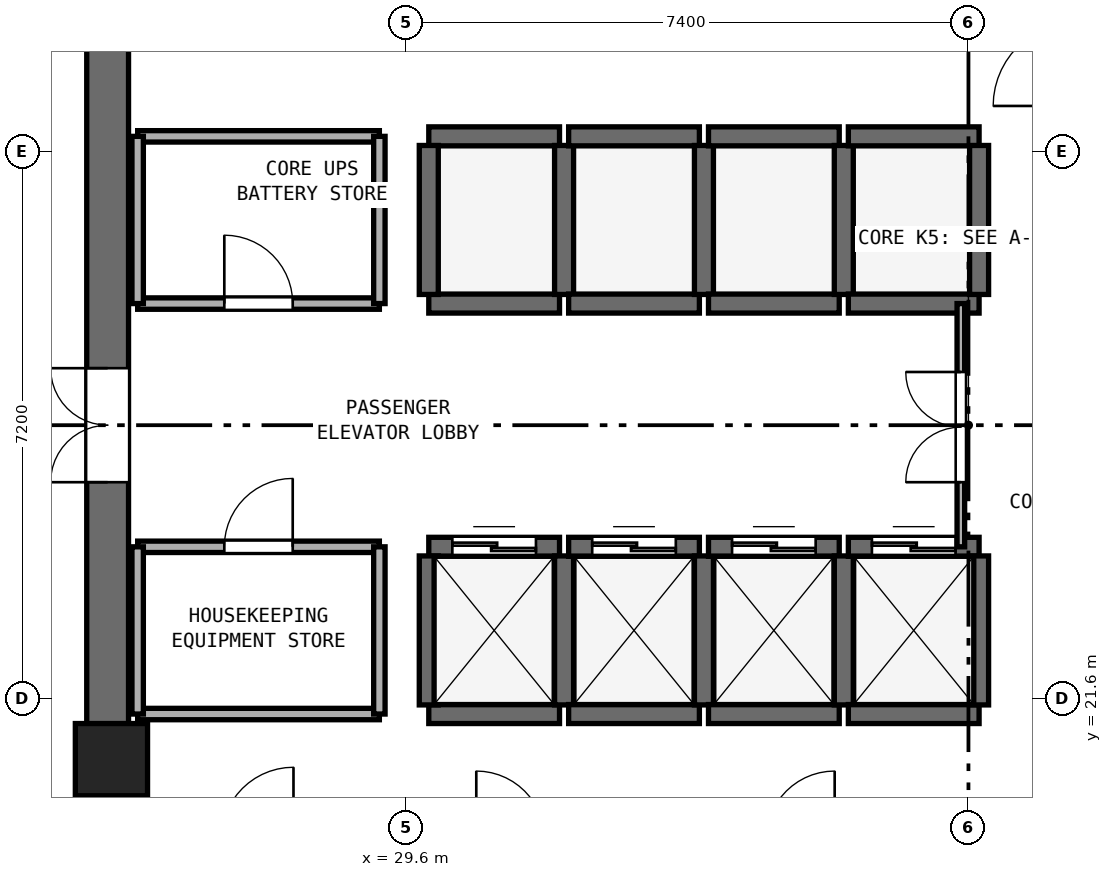
"""IFC4 building model, lengths in metres.
Left out: names, types, materials, properties, quantities, classifications, styles, units other than length and angle.
Written with IfcOpenShell. Run it as: python <this file> out.ifc"""

import sys

from ifc_helpers import new_model, si_unit, direction, frame, frame_2d, origin, origin_2d, place, context, subcontext, project, spatial, rectangle, extrude, element, fill, save


model = new_model("IFC4")
c1 = context("Model", 3, precision=1e-05, world=origin(), true_north=direction((0.0, 1.0)))
c2 = subcontext(c1, "Body", "Model", "MODEL_VIEW")
j1 = project(units=[si_unit("LENGTHUNIT", "METRE"), si_unit("PLANEANGLEUNIT", "RADIAN")], contexts=[c1])
p1 = place(None, origin())
s1 = spatial("IfcSite", under=j1, at=p1, CompositionType="ELEMENT")
p2 = place(p1, origin())
s2 = spatial("IfcBuilding", under=s1, at=p2, CompositionType="ELEMENT")
p3 = place(p2, frame((0.0, 0.0, 132.6)))
s3 = spatial("IfcBuildingStorey", under=s2, at=p3, CompositionType="ELEMENT", Elevation=132.6)
p4 = place(p3, frame((25.675, 17.55, 0.0), z_axis=(0.0, 0.0, 1.0), x_axis=(0.0, 1.0, 0.0)))
e1 = element("IfcWall", 1, at=p4, inside=s3, PredefinedType="SHEAR", context=c2, shape_type="SweptSolid", body=[
    extrude(rectangle(XDim=15.3, YDim=0.55, at=frame_2d((7.65, 0.0))), origin(), (0.0, 0.0, 1.0), 3.54),
])
p5 = place(p4, frame((6.9, 0.0, 0.0)))
e2 = element("IfcOpeningElement", 2, at=p5, cuts=e1, PredefinedType="OPENING", context=c2, shape_type="SweptSolid", body=[
    extrude(rectangle(XDim=1.5, YDim=2.15, at=frame_2d((0.75, 1.075))), frame((0.0, 0.285, 0.0), z_axis=(0.0, -1.0, 0.0), x_axis=(1.0, 0.0, 0.0)), (0.0, 0.0, 1.0), 0.57),
])
p6 = place(p3, frame((25.725, 20.8, 0.0), z_axis=(0.0, 0.0, 1.0), x_axis=(1.0, 0.0, 0.0)))
e3 = element("IfcColumn", 3, at=p6, inside=s3, PredefinedType="PILASTER", context=c2, shape_type="SweptSolid", body=[
    extrude(rectangle(XDim=0.95, YDim=0.95, at=origin_2d()), origin(), (0.0, 0.0, 1.0), 3.8),
])
p7 = place(p3, frame((29.9, 21.4, 0.0), z_axis=(0.0, 0.0, 1.0), x_axis=(1.0, 0.0, 0.0)))
e4 = element("IfcWall", 4, at=p7, inside=s3, PredefinedType="SHEAR", context=c2, shape_type="SweptSolid", body=[
    extrude(rectangle(XDim=1.72, YDim=0.25, at=frame_2d((0.86, 0.0))), origin(), (0.0, 0.0, 1.0), 3.54),
])
p8 = place(p3, frame((29.9, 23.6, 0.0), z_axis=(0.0, 0.0, 1.0), x_axis=(1.0, 0.0, 0.0)))
e5 = element("IfcWall", 5, at=p8, inside=s3, PredefinedType="SHEAR", context=c2, shape_type="SweptSolid", body=[
    extrude(rectangle(XDim=1.72, YDim=0.25, at=frame_2d((0.86, 0.0))), origin(), (0.0, 0.0, 1.0), 3.54),
])
p9 = place(p8, frame((0.31, 0.0, 0.0)))
e6 = element("IfcOpeningElement", 6, at=p9, cuts=e5, PredefinedType="OPENING", context=c2, shape_type="SweptSolid", body=[
    extrude(rectangle(XDim=1.1, YDim=2.15, at=frame_2d((0.55, 1.075))), frame((0.0, 0.135, 0.0), z_axis=(0.0, -1.0, 0.0), x_axis=(1.0, 0.0, 0.0)), (0.0, 0.0, 1.0), 0.27),
])
for number, where, z_axis, x_axis in (
    (7, (29.9, 21.52, 0.0), (0.0, 0.0, 1.0), (0.0, 1.0, 0.0)),
    (8, (31.68, 21.52, 0.0), (0.0, 0.0, 1.0), (0.0, 1.0, 0.0)),
):
    element("IfcWall", number, at=place(p3, frame(where, z_axis=z_axis, x_axis=x_axis)), inside=s3, PredefinedType="SHEAR", context=c2, shape_type="SweptSolid", body=[
        extrude(rectangle(XDim=1.96, YDim=0.25, at=frame_2d((0.98, 0.0))), origin(), (0.0, 0.0, 1.0), 3.54),
    ])
p10 = place(p3, frame((31.74, 21.4, 0.0), z_axis=(0.0, 0.0, 1.0), x_axis=(1.0, 0.0, 0.0)))
e9 = element("IfcWall", 9, at=p10, inside=s3, PredefinedType="SHEAR", context=c2, shape_type="SweptSolid", body=[
    extrude(rectangle(XDim=1.72, YDim=0.25, at=frame_2d((0.86, 0.0))), origin(), (0.0, 0.0, 1.0), 3.54),
])
p11 = place(p3, frame((31.74, 23.6, 0.0), z_axis=(0.0, 0.0, 1.0), x_axis=(1.0, 0.0, 0.0)))
e10 = element("IfcWall", 10, at=p11, inside=s3, PredefinedType="SHEAR", context=c2, shape_type="SweptSolid", body=[
    extrude(rectangle(XDim=1.72, YDim=0.25, at=frame_2d((0.86, 0.0))), origin(), (0.0, 0.0, 1.0), 3.54),
])
p12 = place(p11, frame((0.31, 0.0, 0.0)))
e11 = element("IfcOpeningElement", 11, at=p12, cuts=e10, PredefinedType="OPENING", context=c2, shape_type="SweptSolid", body=[
    extrude(rectangle(XDim=1.1, YDim=2.15, at=frame_2d((0.55, 1.075))), frame((0.0, 0.135, 0.0), z_axis=(0.0, -1.0, 0.0), x_axis=(1.0, 0.0, 0.0)), (0.0, 0.0, 1.0), 0.27),
])
p13 = place(p3, frame((33.52, 21.52, 0.0), z_axis=(0.0, 0.0, 1.0), x_axis=(0.0, 1.0, 0.0)))
e12 = element("IfcWall", 12, at=p13, inside=s3, PredefinedType="SHEAR", context=c2, shape_type="SweptSolid", body=[
    extrude(rectangle(XDim=1.96, YDim=0.25, at=frame_2d((0.98, 0.0))), origin(), (0.0, 0.0, 1.0), 3.54),
])
p14 = place(p3, frame((33.58, 21.4, 0.0), z_axis=(0.0, 0.0, 1.0), x_axis=(1.0, 0.0, 0.0)))
e13 = element("IfcWall", 13, at=p14, inside=s3, PredefinedType="SHEAR", context=c2, shape_type="SweptSolid", body=[
    extrude(rectangle(XDim=1.72, YDim=0.25, at=frame_2d((0.86, 0.0))), origin(), (0.0, 0.0, 1.0), 3.54),
])
p15 = place(p3, frame((33.58, 23.6, 0.0), z_axis=(0.0, 0.0, 1.0), x_axis=(1.0, 0.0, 0.0)))
e14 = element("IfcWall", 14, at=p15, inside=s3, PredefinedType="SHEAR", context=c2, shape_type="SweptSolid", body=[
    extrude(rectangle(XDim=1.72, YDim=0.25, at=frame_2d((0.86, 0.0))), origin(), (0.0, 0.0, 1.0), 3.54),
])
p16 = place(p15, frame((0.31, 0.0, 0.0)))
e15 = element("IfcOpeningElement", 15, at=p16, cuts=e14, PredefinedType="OPENING", context=c2, shape_type="SweptSolid", body=[
    extrude(rectangle(XDim=1.1, YDim=2.15, at=frame_2d((0.55, 1.075))), frame((0.0, 0.135, 0.0), z_axis=(0.0, -1.0, 0.0), x_axis=(1.0, 0.0, 0.0)), (0.0, 0.0, 1.0), 0.27),
])
p17 = place(p3, frame((35.36, 21.52, 0.0), z_axis=(0.0, 0.0, 1.0), x_axis=(0.0, 1.0, 0.0)))
e16 = element("IfcWall", 16, at=p17, inside=s3, PredefinedType="SHEAR", context=c2, shape_type="SweptSolid", body=[
    extrude(rectangle(XDim=1.96, YDim=0.25, at=frame_2d((0.98, 0.0))), origin(), (0.0, 0.0, 1.0), 3.54),
])
p18 = place(p3, frame((35.42, 21.4, 0.0), z_axis=(0.0, 0.0, 1.0), x_axis=(1.0, 0.0, 0.0)))
e17 = element("IfcWall", 17, at=p18, inside=s3, PredefinedType="SHEAR", context=c2, shape_type="SweptSolid", body=[
    extrude(rectangle(XDim=1.72, YDim=0.25, at=frame_2d((0.86, 0.0))), origin(), (0.0, 0.0, 1.0), 3.54),
])
p19 = place(p3, frame((35.42, 23.6, 0.0), z_axis=(0.0, 0.0, 1.0), x_axis=(1.0, 0.0, 0.0)))
e18 = element("IfcWall", 18, at=p19, inside=s3, PredefinedType="SHEAR", context=c2, shape_type="SweptSolid", body=[
    extrude(rectangle(XDim=1.72, YDim=0.25, at=frame_2d((0.86, 0.0))), origin(), (0.0, 0.0, 1.0), 3.54),
])
p20 = place(p19, frame((0.31, 0.0, 0.0)))
e19 = element("IfcOpeningElement", 19, at=p20, cuts=e18, PredefinedType="OPENING", context=c2, shape_type="SweptSolid", body=[
    extrude(rectangle(XDim=1.1, YDim=2.15, at=frame_2d((0.55, 1.075))), frame((0.0, 0.135, 0.0), z_axis=(0.0, -1.0, 0.0), x_axis=(1.0, 0.0, 0.0)), (0.0, 0.0, 1.0), 0.27),
])
p21 = place(p3, frame((37.14, 21.52, 0.0), z_axis=(0.0, 0.0, 1.0), x_axis=(0.0, 1.0, 0.0)))
e20 = element("IfcWall", 20, at=p21, inside=s3, PredefinedType="SHEAR", context=c2, shape_type="SweptSolid", body=[
    extrude(rectangle(XDim=1.96, YDim=0.25, at=frame_2d((0.98, 0.0))), origin(), (0.0, 0.0, 1.0), 3.54),
])
for number, where, z_axis, x_axis in (
    (21, (29.9, 26.8, 0.0), (0.0, 0.0, 1.0), (1.0, 0.0, 0.0)),
    (22, (29.9, 29.0, 0.0), (0.0, 0.0, 1.0), (1.0, 0.0, 0.0)),
):
    element("IfcWall", number, at=place(p3, frame(where, z_axis=z_axis, x_axis=x_axis)), inside=s3, PredefinedType="SHEAR", context=c2, shape_type="SweptSolid", body=[
        extrude(rectangle(XDim=1.72, YDim=0.25, at=frame_2d((0.86, 0.0))), origin(), (0.0, 0.0, 1.0), 3.54),
    ])
for number, where, z_axis, x_axis in (
    (23, (29.9, 26.92, 0.0), (0.0, 0.0, 1.0), (0.0, 1.0, 0.0)),
    (24, (31.68, 26.92, 0.0), (0.0, 0.0, 1.0), (0.0, 1.0, 0.0)),
):
    element("IfcWall", number, at=place(p3, frame(where, z_axis=z_axis, x_axis=x_axis)), inside=s3, PredefinedType="SHEAR", context=c2, shape_type="SweptSolid", body=[
        extrude(rectangle(XDim=1.96, YDim=0.25, at=frame_2d((0.98, 0.0))), origin(), (0.0, 0.0, 1.0), 3.54),
    ])
for number, where, z_axis, x_axis in (
    (25, (31.74, 26.8, 0.0), (0.0, 0.0, 1.0), (1.0, 0.0, 0.0)),
    (26, (31.74, 29.0, 0.0), (0.0, 0.0, 1.0), (1.0, 0.0, 0.0)),
):
    element("IfcWall", number, at=place(p3, frame(where, z_axis=z_axis, x_axis=x_axis)), inside=s3, PredefinedType="SHEAR", context=c2, shape_type="SweptSolid", body=[
        extrude(rectangle(XDim=1.72, YDim=0.25, at=frame_2d((0.86, 0.0))), origin(), (0.0, 0.0, 1.0), 3.54),
    ])
p22 = place(p3, frame((33.52, 26.92, 0.0), z_axis=(0.0, 0.0, 1.0), x_axis=(0.0, 1.0, 0.0)))
e27 = element("IfcWall", 27, at=p22, inside=s3, PredefinedType="SHEAR", context=c2, shape_type="SweptSolid", body=[
    extrude(rectangle(XDim=1.96, YDim=0.25, at=frame_2d((0.98, 0.0))), origin(), (0.0, 0.0, 1.0), 3.54),
])
for number, where, z_axis, x_axis in (
    (28, (33.58, 26.8, 0.0), (0.0, 0.0, 1.0), (1.0, 0.0, 0.0)),
    (29, (33.58, 29.0, 0.0), (0.0, 0.0, 1.0), (1.0, 0.0, 0.0)),
):
    element("IfcWall", number, at=place(p3, frame(where, z_axis=z_axis, x_axis=x_axis)), inside=s3, PredefinedType="SHEAR", context=c2, shape_type="SweptSolid", body=[
        extrude(rectangle(XDim=1.72, YDim=0.25, at=frame_2d((0.86, 0.0))), origin(), (0.0, 0.0, 1.0), 3.54),
    ])
p23 = place(p3, frame((35.36, 26.92, 0.0), z_axis=(0.0, 0.0, 1.0), x_axis=(0.0, 1.0, 0.0)))
e30 = element("IfcWall", 30, at=p23, inside=s3, PredefinedType="SHEAR", context=c2, shape_type="SweptSolid", body=[
    extrude(rectangle(XDim=1.96, YDim=0.25, at=frame_2d((0.98, 0.0))), origin(), (0.0, 0.0, 1.0), 3.54),
])
for number, where, z_axis, x_axis in (
    (31, (35.42, 26.8, 0.0), (0.0, 0.0, 1.0), (1.0, 0.0, 0.0)),
    (32, (35.42, 29.0, 0.0), (0.0, 0.0, 1.0), (1.0, 0.0, 0.0)),
):
    element("IfcWall", number, at=place(p3, frame(where, z_axis=z_axis, x_axis=x_axis)), inside=s3, PredefinedType="SHEAR", context=c2, shape_type="SweptSolid", body=[
        extrude(rectangle(XDim=1.72, YDim=0.25, at=frame_2d((0.86, 0.0))), origin(), (0.0, 0.0, 1.0), 3.54),
    ])
p24 = place(p3, frame((37.14, 26.92, 0.0), z_axis=(0.0, 0.0, 1.0), x_axis=(0.0, 1.0, 0.0)))
e33 = element("IfcWall", 33, at=p24, inside=s3, PredefinedType="SHEAR", context=c2, shape_type="SweptSolid", body=[
    extrude(rectangle(XDim=1.96, YDim=0.25, at=frame_2d((0.98, 0.0))), origin(), (0.0, 0.0, 1.0), 3.54),
])
p25 = place(p3, frame((26.07, 26.8, 0.0), z_axis=(0.0, 0.0, 1.0), x_axis=(1.0, 0.0, 0.0)))
e34 = element("IfcWall", 34, at=p25, inside=s3, PredefinedType="PARTITIONING", context=c2, shape_type="SweptSolid", body=[
    extrude(rectangle(XDim=3.18, YDim=0.15, at=frame_2d((1.59, 0.0))), origin(), (0.0, 0.0, 1.0), 3.54),
])
p26 = place(p25, frame((1.14, 0.0, 0.0)))
e35 = element("IfcOpeningElement", 35, at=p26, cuts=e34, PredefinedType="OPENING", context=c2, shape_type="SweptSolid", body=[
    extrude(rectangle(XDim=0.9, YDim=2.1, at=frame_2d((0.45, 1.05))), frame((0.0, 0.085, 0.0), z_axis=(0.0, -1.0, 0.0), x_axis=(1.0, 0.0, 0.0)), (0.0, 0.0, 1.0), 0.17),
])
p27 = place(p3, frame((26.07, 29.0, 0.0), z_axis=(0.0, 0.0, 1.0), x_axis=(1.0, 0.0, 0.0)))
e36 = element("IfcWall", 36, at=p27, inside=s3, PredefinedType="PARTITIONING", context=c2, shape_type="SweptSolid", body=[
    extrude(rectangle(XDim=3.18, YDim=0.15, at=frame_2d((1.59, 0.0))), origin(), (0.0, 0.0, 1.0), 3.54),
])
p28 = place(p3, frame((26.07, 26.8, 0.0), z_axis=(0.0, 0.0, 1.0), x_axis=(0.0, 1.0, 0.0)))
e37 = element("IfcWall", 37, at=p28, inside=s3, PredefinedType="PARTITIONING", context=c2, shape_type="SweptSolid", body=[
    extrude(rectangle(XDim=2.2, YDim=0.15, at=frame_2d((1.1, 0.0))), origin(), (0.0, 0.0, 1.0), 2.64),
])
p29 = place(p3, frame((29.25, 26.8, 0.0), z_axis=(0.0, 0.0, 1.0), x_axis=(0.0, 1.0, 0.0)))
e38 = element("IfcWall", 38, at=p29, inside=s3, PredefinedType="PARTITIONING", context=c2, shape_type="SweptSolid", body=[
    extrude(rectangle(XDim=2.2, YDim=0.15, at=frame_2d((1.1, 0.0))), origin(), (0.0, 0.0, 1.0), 3.54),
])
p30 = place(p3, frame((26.07, 21.4, 0.0), z_axis=(0.0, 0.0, 1.0), x_axis=(1.0, 0.0, 0.0)))
e39 = element("IfcWall", 39, at=p30, inside=s3, PredefinedType="PARTITIONING", context=c2, shape_type="SweptSolid", body=[
    extrude(rectangle(XDim=3.18, YDim=0.15, at=frame_2d((1.59, 0.0))), origin(), (0.0, 0.0, 1.0), 3.54),
])
p31 = place(p3, frame((26.07, 23.6, 0.0), z_axis=(0.0, 0.0, 1.0), x_axis=(1.0, 0.0, 0.0)))
e40 = element("IfcWall", 40, at=p31, inside=s3, PredefinedType="PARTITIONING", context=c2, shape_type="SweptSolid", body=[
    extrude(rectangle(XDim=3.18, YDim=0.15, at=frame_2d((1.59, 0.0))), origin(), (0.0, 0.0, 1.0), 3.54),
])
p32 = place(p31, frame((1.14, 0.0, 0.0)))
e41 = element("IfcOpeningElement", 41, at=p32, cuts=e40, PredefinedType="OPENING", context=c2, shape_type="SweptSolid", body=[
    extrude(rectangle(XDim=0.9, YDim=2.1, at=frame_2d((0.45, 1.05))), frame((0.0, 0.085, 0.0), z_axis=(0.0, -1.0, 0.0), x_axis=(1.0, 0.0, 0.0)), (0.0, 0.0, 1.0), 0.17),
])
p33 = place(p3, frame((26.07, 21.4, 0.0), z_axis=(0.0, 0.0, 1.0), x_axis=(0.0, 1.0, 0.0)))
e42 = element("IfcWall", 42, at=p33, inside=s3, PredefinedType="PARTITIONING", context=c2, shape_type="SweptSolid", body=[
    extrude(rectangle(XDim=2.2, YDim=0.15, at=frame_2d((1.1, 0.0))), origin(), (0.0, 0.0, 1.0), 2.64),
])
p34 = place(p3, frame((29.25, 21.4, 0.0), z_axis=(0.0, 0.0, 1.0), x_axis=(0.0, 1.0, 0.0)))
e43 = element("IfcWall", 43, at=p34, inside=s3, PredefinedType="PARTITIONING", context=c2, shape_type="SweptSolid", body=[
    extrude(rectangle(XDim=2.2, YDim=0.15, at=frame_2d((1.1, 0.0))), origin(), (0.0, 0.0, 1.0), 3.54),
])
p35 = place(p3, frame((36.9, 23.6, 0.0), z_axis=(0.0, 0.0, 1.0), x_axis=(0.0, 1.0, 0.0)))
e44 = element("IfcWall", 44, at=p35, inside=s3, PredefinedType="PARTITIONING", context=c2, shape_type="SweptSolid", body=[
    extrude(rectangle(XDim=3.2, YDim=0.1, at=frame_2d((1.6, 0.0))), origin(), (0.0, 0.0, 1.0), 3.54),
])
p36 = place(p35, frame((0.85, 0.0, 0.0)))
e45 = element("IfcOpeningElement", 45, at=p36, cuts=e44, PredefinedType="OPENING", context=c2, shape_type="SweptSolid", body=[
    extrude(rectangle(XDim=1.45, YDim=2.12, at=frame_2d((0.725, 1.06))), frame((0.0, 0.06, 0.0), z_axis=(0.0, -1.0, 0.0), x_axis=(1.0, 0.0, 0.0)), (0.0, 0.0, 1.0), 0.12),
])
p37 = place(p9, origin())
e46 = element("IfcDoor", 46, at=p37, inside=s3, OperationType="DOUBLE_DOOR_SLIDING", PredefinedType="DOOR", context=c2, shape_type="SweptSolid", body=[
    extrude(rectangle(XDim=1.1, YDim=2.15, at=frame_2d((0.55, 1.075))), frame((0.0, 0.025, 0.0), z_axis=(0.0, -1.0, 0.0), x_axis=(1.0, 0.0, 0.0)), (0.0, 0.0, 1.0), 0.05),
])
fill(e6, e46)
p38 = place(p12, origin())
e47 = element("IfcDoor", 47, at=p38, inside=s3, OperationType="DOUBLE_DOOR_SLIDING", PredefinedType="DOOR", context=c2, shape_type="SweptSolid", body=[
    extrude(rectangle(XDim=1.1, YDim=2.15, at=frame_2d((0.55, 1.075))), frame((0.0, 0.025, 0.0), z_axis=(0.0, -1.0, 0.0), x_axis=(1.0, 0.0, 0.0)), (0.0, 0.0, 1.0), 0.05),
])
fill(e11, e47)
p39 = place(p16, origin())
e48 = element("IfcDoor", 48, at=p39, inside=s3, OperationType="DOUBLE_DOOR_SLIDING", PredefinedType="DOOR", context=c2, shape_type="SweptSolid", body=[
    extrude(rectangle(XDim=1.1, YDim=2.15, at=frame_2d((0.55, 1.075))), frame((0.0, 0.025, 0.0), z_axis=(0.0, -1.0, 0.0), x_axis=(1.0, 0.0, 0.0)), (0.0, 0.0, 1.0), 0.05),
])
fill(e15, e48)
p40 = place(p20, origin())
e49 = element("IfcDoor", 49, at=p40, inside=s3, OperationType="DOUBLE_DOOR_SLIDING", PredefinedType="DOOR", context=c2, shape_type="SweptSolid", body=[
    extrude(rectangle(XDim=1.1, YDim=2.15, at=frame_2d((0.55, 1.075))), frame((0.0, 0.025, 0.0), z_axis=(0.0, -1.0, 0.0), x_axis=(1.0, 0.0, 0.0)), (0.0, 0.0, 1.0), 0.05),
])
fill(e19, e49)
p41 = place(p5, origin())
e50 = element("IfcDoor", 50, at=p41, inside=s3, OperationType="DOUBLE_DOOR_SINGLE_SWING", PredefinedType="DOOR", context=c2, shape_type="SweptSolid", body=[
    extrude(rectangle(XDim=1.5, YDim=2.15, at=frame_2d((0.75, 1.075))), frame((0.0, 0.025, 0.0), z_axis=(0.0, -1.0, 0.0), x_axis=(1.0, 0.0, 0.0)), (0.0, 0.0, 1.0), 0.05),
])
fill(e2, e50)
p42 = place(p26, origin())
e51 = element("IfcDoor", 51, at=p42, inside=s3, OperationType="SINGLE_SWING_LEFT", PredefinedType="DOOR", context=c2, shape_type="SweptSolid", body=[
    extrude(rectangle(XDim=0.9, YDim=2.1, at=frame_2d((0.45, 1.05))), frame((0.0, 0.025, 0.0), z_axis=(0.0, -1.0, 0.0), x_axis=(1.0, 0.0, 0.0)), (0.0, 0.0, 1.0), 0.05),
])
fill(e35, e51)
p43 = place(p32, origin())
e52 = element("IfcDoor", 52, at=p43, inside=s3, OperationType="SINGLE_SWING_RIGHT", PredefinedType="DOOR", context=c2, shape_type="SweptSolid", body=[
    extrude(rectangle(XDim=0.9, YDim=2.1, at=frame_2d((0.45, 1.05))), frame((0.0, 0.025, 0.0), z_axis=(0.0, -1.0, 0.0), x_axis=(1.0, 0.0, 0.0)), (0.0, 0.0, 1.0), 0.05),
])
fill(e41, e52)
p44 = place(p36, origin())
e53 = element("IfcDoor", 53, at=p44, inside=s3, OperationType="DOUBLE_DOOR_SINGLE_SWING", PredefinedType="DOOR", context=c2, shape_type="SweptSolid", body=[
    extrude(rectangle(XDim=1.45, YDim=2.12, at=frame_2d((0.725, 1.06))), frame((0.0, 0.025, 0.0), z_axis=(0.0, -1.0, 0.0), x_axis=(1.0, 0.0, 0.0)), (0.0, 0.0, 1.0), 0.05),
])
fill(e45, e53)
save(model, sys.argv[1])
